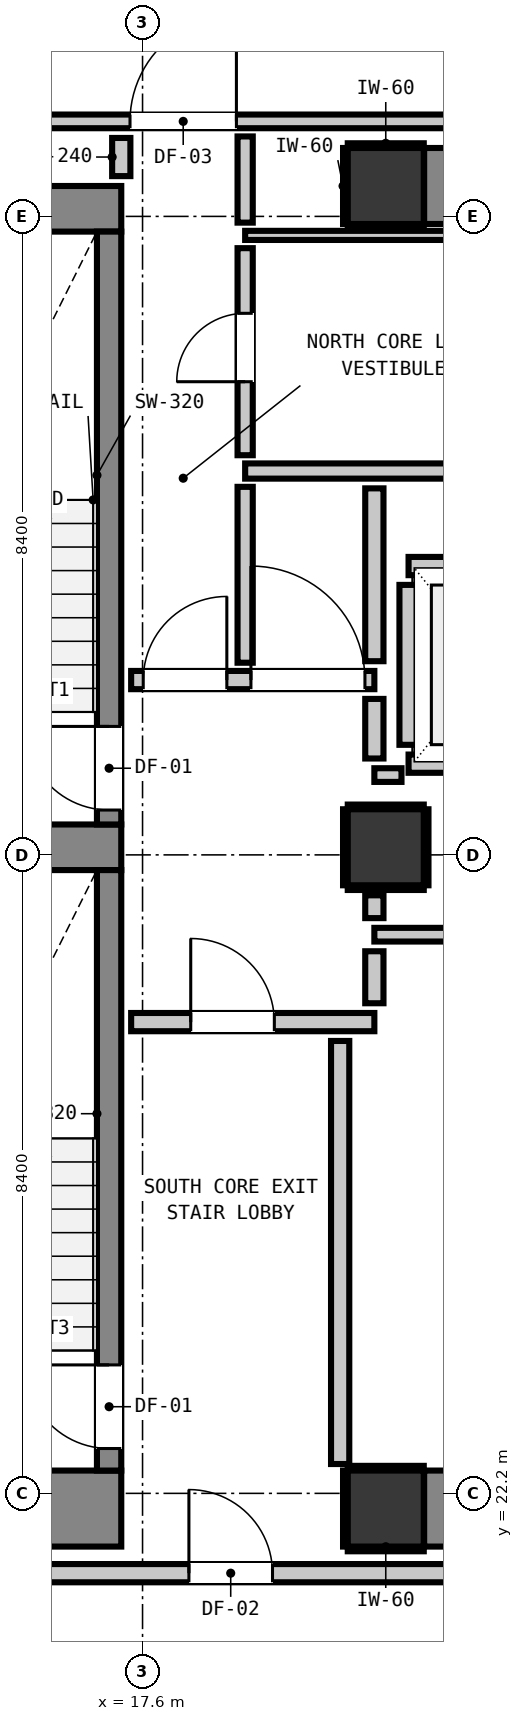
"""IFC4 building model, lengths in metres.
Left out: names, types, materials, properties, quantities, classifications, styles, units other than length and angle.
Written with IfcOpenShell. Run it as: python <this file> out.ifc"""

import sys

from ifc_helpers import new_model, si_unit, direction, frame, frame_2d, origin, origin_2d, place, context, subcontext, project, spatial, rectangle, extrude, element, fill, save


model = new_model("IFC4")
c1 = context("Model", 3, precision=1e-05, world=origin(), true_north=direction((0.0, 1.0)))
c2 = subcontext(c1, "Body", "Model", "MODEL_VIEW")
j1 = project(units=[si_unit("LENGTHUNIT", "METRE"), si_unit("PLANEANGLEUNIT", "RADIAN")], contexts=[c1])
p1 = place(None, origin())
s1 = spatial("IfcSite", under=j1, at=p1, CompositionType="ELEMENT")
p2 = place(p1, origin())
s2 = spatial("IfcBuilding", under=s1, at=p2, CompositionType="ELEMENT")
p3 = place(p2, frame((0.0, 0.0, 135.96)))
s3 = spatial("IfcBuildingStorey", under=s2, at=p3, CompositionType="ELEMENT", Elevation=135.96)
for number, where, z_axis, x_axis in (
    (1, (20.8, 22.0, 0.0), (0.0, 0.0, 1.0), (1.0, 0.0, 0.0)),
    (2, (20.8, 39.4, 0.0), (0.0, 0.0, 1.0), (1.0, 0.0, 0.0)),
):
    element("IfcColumn", number, at=place(p3, frame(where, z_axis=z_axis, x_axis=x_axis)), inside=s3, PredefinedType="COLUMN", context=c2, shape_type="SweptSolid", body=[
        extrude(rectangle(XDim=1.0, YDim=1.0, at=origin_2d()), origin(), (0.0, 0.0, 1.0), 3.32),
    ])
p4 = place(p3, frame((13.24, 22.0, 0.0), z_axis=(0.0, 0.0, 1.0), x_axis=(1.0, 0.0, 0.0)))
e3 = element("IfcWall", 3, at=p4, inside=s3, PredefinedType="SHEAR", context=c2, shape_type="SweptSolid", body=[
    extrude(rectangle(XDim=4.08, YDim=1.0, at=frame_2d((2.04, 0.0))), origin(), (0.0, 0.0, 1.0), 3.32),
])
p5 = place(p3, frame((13.24, 39.1, 0.0), z_axis=(0.0, 0.0, 1.0), x_axis=(1.0, 0.0, 0.0)))
e4 = element("IfcWall", 4, at=p5, inside=s3, PredefinedType="SHEAR", context=c2, shape_type="SweptSolid", body=[
    extrude(rectangle(XDim=4.08, YDim=0.6, at=frame_2d((2.04, 0.0))), origin(), (0.0, 0.0, 1.0), 3.32),
])
p6 = place(p3, frame((13.905, 30.7, 0.0), z_axis=(0.0, 0.0, 1.0), x_axis=(1.0, 0.0, 0.0)))
e5 = element("IfcWall", 5, at=p6, inside=s3, PredefinedType="SHEAR", context=c2, shape_type="SweptSolid", body=[
    extrude(rectangle(XDim=3.415, YDim=0.6, at=frame_2d((1.708, 0.0))), origin(), (0.0, 0.0, 1.0), 3.32),
])
for number, where, z_axis, x_axis in (
    (6, (21.305, 22.0, 0.0), (0.0, 0.0, 1.0), (1.0, 0.0, 0.0)),
    (7, (21.305, 39.4, 0.0), (0.0, 0.0, 1.0), (1.0, 0.0, 0.0)),
):
    element("IfcWall", number, at=place(p3, frame(where, z_axis=z_axis, x_axis=x_axis)), inside=s3, PredefinedType="SHEAR", context=c2, shape_type="SweptSolid", body=[
        extrude(rectangle(XDim=7.39, YDim=1.0, at=frame_2d((3.695, 0.0))), origin(), (0.0, 0.0, 1.0), 3.32),
    ])
p7 = place(p3, frame((17.16, 31.0, 0.0), z_axis=(0.0, 0.0, 1.0), x_axis=(0.0, 1.0, 0.0)))
e8 = element("IfcWall", 8, at=p7, inside=s3, PredefinedType="SHEAR", context=c2, shape_type="SweptSolid", body=[
    extrude(rectangle(XDim=7.8, YDim=0.32, at=frame_2d((3.9, 0.0))), origin(), (0.0, 0.0, 1.0), 3.32),
])
p8 = place(p7, frame((0.19, 0.0, 0.0)))
e9 = element("IfcOpeningElement", 9, at=p8, cuts=e8, PredefinedType="OPENING", context=c2, shape_type="SweptSolid", body=[
    extrude(rectangle(XDim=1.1, YDim=2.15, at=frame_2d((0.55, 1.075))), frame((0.0, 0.17, 0.0), z_axis=(0.0, -1.0, 0.0), x_axis=(1.0, 0.0, 0.0)), (0.0, 0.0, 1.0), 0.34),
])
p9 = place(p3, frame((17.16, 22.5, 0.0), z_axis=(0.0, 0.0, 1.0), x_axis=(0.0, 1.0, 0.0)))
e10 = element("IfcWall", 10, at=p9, inside=s3, PredefinedType="SHEAR", context=c2, shape_type="SweptSolid", body=[
    extrude(rectangle(XDim=7.9, YDim=0.32, at=frame_2d((3.95, 0.0))), origin(), (0.0, 0.0, 1.0), 3.32),
])
p10 = place(p9, frame((0.29, 0.0, 0.0)))
e11 = element("IfcOpeningElement", 11, at=p10, cuts=e10, PredefinedType="OPENING", context=c2, shape_type="SweptSolid", body=[
    extrude(rectangle(XDim=1.1, YDim=2.15, at=frame_2d((0.55, 1.075))), frame((0.0, 0.17, 0.0), z_axis=(0.0, -1.0, 0.0), x_axis=(1.0, 0.0, 0.0)), (0.0, 0.0, 1.0), 0.34),
])
p11 = place(p3, frame((20.8, 30.7, 0.0), z_axis=(0.0, 0.0, 1.0), x_axis=(1.0, 0.0, 0.0)))
e12 = element("IfcColumn", 12, at=p11, inside=s3, PredefinedType="COLUMN", context=c2, shape_type="SweptSolid", body=[
    extrude(rectangle(XDim=1.0, YDim=1.0, at=origin_2d()), origin(), (0.0, 0.0, 1.0), 3.32),
])
for number, where, z_axis, x_axis in (
    (13, (21.1, 31.8, 0.0), (0.0, 0.0, 1.0), (1.0, 0.0, 0.0)),
    (14, (21.1, 34.4, 0.0), (0.0, 0.0, 1.0), (1.0, 0.0, 0.0)),
):
    element("IfcWall", number, at=place(p3, frame(where, z_axis=z_axis, x_axis=x_axis)), inside=s3, PredefinedType="PARTITIONING", context=c2, shape_type="SweptSolid", body=[
        extrude(rectangle(XDim=2.2, YDim=0.24, at=frame_2d((1.1, 0.0))), origin(), (0.0, 0.0, 1.0), 3.08),
    ])
p12 = place(p3, frame((21.1, 32.048, 0.0), z_axis=(0.0, 0.0, 1.0), x_axis=(0.0, 1.0, 0.0)))
e15 = element("IfcWall", 15, at=p12, inside=s3, PredefinedType="PARTITIONING", context=c2, shape_type="SweptSolid", body=[
    extrude(rectangle(XDim=2.104, YDim=0.24, at=frame_2d((1.052, 0.0))), origin(), (0.0, 0.0, 1.0), 2.315),
])
p13 = place(p3, frame((9.407, 21.15, 0.0), z_axis=(0.0, 0.0, 1.0), x_axis=(1.0, 0.0, 0.0)))
e16 = element("IfcWall", 16, at=p13, inside=s3, PredefinedType="PARTITIONING", context=c2, shape_type="SweptSolid", body=[
    extrude(rectangle(XDim=39.386, YDim=0.24, at=frame_2d((19.693, 0.0))), origin(), (0.0, 0.0, 1.0), 3.08),
])
p14 = place(p13, frame((8.803, 0.0, 0.0)))
e17 = element("IfcOpeningElement", 17, at=p14, cuts=e16, PredefinedType="OPENING", context=c2, shape_type="SweptSolid", body=[
    extrude(rectangle(XDim=1.1, YDim=2.15, at=frame_2d((0.55, 1.075))), frame((0.0, 0.13, 0.0), z_axis=(0.0, -1.0, 0.0), x_axis=(1.0, 0.0, 0.0)), (0.0, 0.0, 1.0), 0.26),
])
p15 = place(p13, frame((1.192, 0.0, 0.0)))
e18 = element("IfcOpeningElement", 18, at=p15, cuts=e16, PredefinedType="OPENING", context=c2, shape_type="SweptSolid", body=[
    extrude(rectangle(XDim=1.4, YDim=2.15, at=frame_2d((0.7, 1.075))), frame((0.0, 0.13, 0.0), z_axis=(0.0, -1.0, 0.0), x_axis=(1.0, 0.0, 0.0)), (0.0, 0.0, 1.0), 0.26),
])
p16 = place(p13, frame((28.643, 0.0, 0.0)))
e19 = element("IfcOpeningElement", 19, at=p16, cuts=e16, PredefinedType="OPENING", context=c2, shape_type="SweptSolid", body=[
    extrude(rectangle(XDim=1.4, YDim=2.15, at=frame_2d((0.7, 1.075))), frame((0.0, 0.13, 0.0), z_axis=(0.0, -1.0, 0.0), x_axis=(1.0, 0.0, 0.0)), (0.0, 0.0, 1.0), 0.26),
])
p17 = place(p3, frame((17.45, 28.4, 0.0), z_axis=(0.0, 0.0, 1.0), x_axis=(1.0, 0.0, 0.0)))
e20 = element("IfcWall", 20, at=p17, inside=s3, PredefinedType="PARTITIONING", context=c2, shape_type="SweptSolid", body=[
    extrude(rectangle(XDim=3.2, YDim=0.24, at=frame_2d((1.6, 0.0))), origin(), (0.0, 0.0, 1.0), 3.08),
])
p18 = place(p17, frame((0.784, 0.0, 0.0)))
e21 = element("IfcOpeningElement", 21, at=p18, cuts=e20, PredefinedType="OPENING", context=c2, shape_type="SweptSolid", body=[
    extrude(rectangle(XDim=1.1, YDim=2.15, at=frame_2d((0.55, 1.075))), frame((0.0, 0.13, 0.0), z_axis=(0.0, -1.0, 0.0), x_axis=(1.0, 0.0, 0.0)), (0.0, 0.0, 1.0), 0.26),
])
p19 = place(p3, frame((17.45, 32.9, 0.0), z_axis=(0.0, 0.0, 1.0), x_axis=(1.0, 0.0, 0.0)))
e22 = element("IfcWall", 22, at=p19, inside=s3, PredefinedType="PARTITIONING", context=c2, shape_type="SweptSolid", body=[
    extrude(rectangle(XDim=3.2, YDim=0.24, at=frame_2d((1.6, 0.0))), origin(), (0.0, 0.0, 1.0), 3.08),
])
p20 = place(p19, frame((0.159, 0.0, 0.0)))
e23 = element("IfcOpeningElement", 23, at=p20, cuts=e22, PredefinedType="OPENING", context=c2, shape_type="SweptSolid", body=[
    extrude(rectangle(XDim=1.1, YDim=2.15, at=frame_2d((0.55, 1.075))), frame((0.0, 0.13, 0.0), z_axis=(0.0, -1.0, 0.0), x_axis=(1.0, 0.0, 0.0)), (0.0, 0.0, 1.0), 0.26),
])
p21 = place(p19, frame((1.576, 0.0, 0.0)))
e24 = element("IfcOpeningElement", 24, at=p21, cuts=e22, PredefinedType="OPENING", context=c2, shape_type="SweptSolid", body=[
    extrude(rectangle(XDim=1.5, YDim=2.15, at=frame_2d((0.75, 1.075))), frame((0.0, 0.13, 0.0), z_axis=(0.0, -1.0, 0.0), x_axis=(1.0, 0.0, 0.0)), (0.0, 0.0, 1.0), 0.26),
])
p22 = place(p3, frame((18.95, 35.65, 0.0), z_axis=(0.0, 0.0, 1.0), x_axis=(1.0, 0.0, 0.0)))
e25 = element("IfcWall", 25, at=p22, inside=s3, PredefinedType="PARTITIONING", context=c2, shape_type="SweptSolid", body=[
    extrude(rectangle(XDim=11.025, YDim=0.2, at=frame_2d((5.513, 0.0))), origin(), (0.0, 0.0, 1.0), 3.08),
])
p23 = place(p3, frame((20.65, 29.55, 0.0), z_axis=(0.0, 0.0, 1.0), x_axis=(1.0, 0.0, 0.0)))
e26 = element("IfcWall", 26, at=p23, inside=s3, PredefinedType="PARTITIONING", context=c2, shape_type="SweptSolid", body=[
    extrude(rectangle(XDim=9.325, YDim=0.18, at=frame_2d((4.663, 0.0))), origin(), (0.0, 0.0, 1.0), 3.08),
])
p24 = place(p3, frame((20.65, 31.65, 0.0), z_axis=(0.0, 0.0, 1.0), x_axis=(1.0, 0.0, 0.0)))
e27 = element("IfcWall", 27, at=p24, inside=s3, PredefinedType="PARTITIONING", context=c2, shape_type="SweptSolid", body=[
    extrude(rectangle(XDim=0.357, YDim=0.18, at=frame_2d((0.179, 0.0))), origin(), (0.0, 0.0, 1.0), 3.08),
])
p25 = place(p3, frame((9.407, 40.25, 0.0), z_axis=(0.0, 0.0, 1.0), x_axis=(1.0, 0.0, 0.0)))
e28 = element("IfcWall", 28, at=p25, inside=s3, PredefinedType="PARTITIONING", context=c2, shape_type="SweptSolid", body=[
    extrude(rectangle(XDim=27.536, YDim=0.18, at=frame_2d((13.768, 0.0))), origin(), (0.0, 0.0, 1.0), 3.08),
])
p26 = place(p25, frame((8.028, 0.0, 0.0)))
e29 = element("IfcOpeningElement", 29, at=p26, cuts=e28, PredefinedType="OPENING", context=c2, shape_type="SweptSolid", body=[
    extrude(rectangle(XDim=1.4, YDim=2.15, at=frame_2d((0.7, 1.075))), frame((0.0, 0.1, 0.0), z_axis=(0.0, -1.0, 0.0), x_axis=(1.0, 0.0, 0.0)), (0.0, 0.0, 1.0), 0.2),
])
p27 = place(p25, frame((1.192, 0.0, 0.0)))
e30 = element("IfcOpeningElement", 30, at=p27, cuts=e28, PredefinedType="OPENING", context=c2, shape_type="SweptSolid", body=[
    extrude(rectangle(XDim=1.4, YDim=2.15, at=frame_2d((0.7, 1.075))), frame((0.0, 0.1, 0.0), z_axis=(0.0, -1.0, 0.0), x_axis=(1.0, 0.0, 0.0)), (0.0, 0.0, 1.0), 0.2),
])
p28 = place(p3, frame((18.95, 38.75, 0.0), z_axis=(0.0, 0.0, 1.0), x_axis=(1.0, 0.0, 0.0)))
e31 = element("IfcWall", 31, at=p28, inside=s3, PredefinedType="PARTITIONING", context=c2, shape_type="SweptSolid", body=[
    extrude(rectangle(XDim=13.56, YDim=0.12, at=frame_2d((6.78, 0.0))), origin(), (0.0, 0.0, 1.0), 3.08),
])
p29 = place(p3, frame((17.32, 39.53, 0.0), z_axis=(0.0, 0.0, 1.0), x_axis=(0.0, 1.0, 0.0)))
e32 = element("IfcWall", 32, at=p29, inside=s3, PredefinedType="PARTITIONING", context=c2, shape_type="SweptSolid", body=[
    extrude(rectangle(XDim=0.502, YDim=0.24, at=frame_2d((0.251, 0.0))), origin(), (0.0, 0.0, 1.0), 3.08),
])
p30 = place(p3, frame((20.2, 22.586, 0.0), z_axis=(0.0, 0.0, 1.0), x_axis=(0.0, 1.0, 0.0)))
e33 = element("IfcWall", 33, at=p30, inside=s3, PredefinedType="PARTITIONING", context=c2, shape_type="SweptSolid", body=[
    extrude(rectangle(XDim=5.566, YDim=0.24, at=frame_2d((2.783, 0.0))), origin(), (0.0, 0.0, 1.0), 3.08),
])
p31 = place(p3, frame((20.65, 28.648, 0.0), z_axis=(0.0, 0.0, 1.0), x_axis=(0.0, 1.0, 0.0)))
e34 = element("IfcWall", 34, at=p31, inside=s3, PredefinedType="PARTITIONING", context=c2, shape_type="SweptSolid", body=[
    extrude(rectangle(XDim=0.684, YDim=0.24, at=frame_2d((0.342, 0.0))), origin(), (0.0, 0.0, 1.0), 2.315),
])
p32 = place(p3, frame((20.65, 29.768, 0.0), z_axis=(0.0, 0.0, 1.0), x_axis=(0.0, 1.0, 0.0)))
e35 = element("IfcWall", 35, at=p32, inside=s3, PredefinedType="PARTITIONING", context=c2, shape_type="SweptSolid", body=[
    extrude(rectangle(XDim=0.3, YDim=0.24, at=frame_2d((0.15, 0.0))), origin(), (0.0, 0.0, 1.0), 2.315),
])
p33 = place(p3, frame((20.65, 31.868, 0.0), z_axis=(0.0, 0.0, 1.0), x_axis=(0.0, 1.0, 0.0)))
e36 = element("IfcWall", 36, at=p33, inside=s3, PredefinedType="PARTITIONING", context=c2, shape_type="SweptSolid", body=[
    extrude(rectangle(XDim=0.784, YDim=0.24, at=frame_2d((0.392, 0.0))), origin(), (0.0, 0.0, 1.0), 2.315),
])
p34 = place(p3, frame((20.65, 33.148, 0.0), z_axis=(0.0, 0.0, 1.0), x_axis=(0.0, 1.0, 0.0)))
e37 = element("IfcWall", 37, at=p34, inside=s3, PredefinedType="PARTITIONING", context=c2, shape_type="SweptSolid", body=[
    extrude(rectangle(XDim=2.274, YDim=0.24, at=frame_2d((1.137, 0.0))), origin(), (0.0, 0.0, 1.0), 2.315),
])
p35 = place(p3, frame((18.95, 33.128, 0.0), z_axis=(0.0, 0.0, 1.0), x_axis=(0.0, 1.0, 0.0)))
e38 = element("IfcWall", 38, at=p35, inside=s3, PredefinedType="PARTITIONING", context=c2, shape_type="SweptSolid", body=[
    extrude(rectangle(XDim=2.314, YDim=0.2, at=frame_2d((1.157, 0.0))), origin(), (0.0, 0.0, 1.0), 3.08),
])
p36 = place(p3, frame((18.95, 35.858, 0.0), z_axis=(0.0, 0.0, 1.0), x_axis=(0.0, 1.0, 0.0)))
e39 = element("IfcWall", 39, at=p36, inside=s3, PredefinedType="PARTITIONING", context=c2, shape_type="SweptSolid", body=[
    extrude(rectangle(XDim=2.724, YDim=0.2, at=frame_2d((1.362, 0.0))), origin(), (0.0, 0.0, 1.0), 3.08),
])
p37 = place(p36, frame((0.967, 0.0, 0.0)))
e40 = element("IfcOpeningElement", 40, at=p37, cuts=e39, PredefinedType="OPENING", context=c2, shape_type="SweptSolid", body=[
    extrude(rectangle(XDim=0.9, YDim=2.1, at=frame_2d((0.45, 1.05))), frame((0.0, 0.11, 0.0), z_axis=(0.0, -1.0, 0.0), x_axis=(1.0, 0.0, 0.0)), (0.0, 0.0, 1.0), 0.22),
])
p38 = place(p3, frame((18.95, 38.918, 0.0), z_axis=(0.0, 0.0, 1.0), x_axis=(0.0, 1.0, 0.0)))
e41 = element("IfcWall", 41, at=p38, inside=s3, PredefinedType="PARTITIONING", context=c2, shape_type="SweptSolid", body=[
    extrude(rectangle(XDim=1.134, YDim=0.2, at=frame_2d((0.567, 0.0))), origin(), (0.0, 0.0, 1.0), 3.08),
])
for number, where, z_axis, x_axis in (
    (42, (20.3, 21.468, 0.0), (0.0, 0.0, 1.0), (1.0, 0.0, 0.0)),
    (43, (20.3, 22.532, 0.0), (0.0, 0.0, 1.0), (1.0, 0.0, 0.0)),
    (44, (20.268, 21.5, 0.0), (0.0, 0.0, 1.0), (0.0, 1.0, 0.0)),
    (45, (20.3, 38.868, 0.0), (0.0, 0.0, 1.0), (1.0, 0.0, 0.0)),
    (46, (20.3, 39.932, 0.0), (0.0, 0.0, 1.0), (1.0, 0.0, 0.0)),
    (47, (20.268, 38.9, 0.0), (0.0, 0.0, 1.0), (0.0, 1.0, 0.0)),
    (48, (20.3, 30.168, 0.0), (0.0, 0.0, 1.0), (1.0, 0.0, 0.0)),
    (49, (20.3, 31.232, 0.0), (0.0, 0.0, 1.0), (1.0, 0.0, 0.0)),
    (50, (20.268, 30.2, 0.0), (0.0, 0.0, 1.0), (0.0, 1.0, 0.0)),
    (51, (21.332, 30.2, 0.0), (0.0, 0.0, 1.0), (0.0, 1.0, 0.0)),
):
    element("IfcWall", number, at=place(p3, frame(where, z_axis=z_axis, x_axis=x_axis)), inside=s3, PredefinedType="PARTITIONING", context=c2, shape_type="SweptSolid", body=[
        extrude(rectangle(XDim=1.0, YDim=0.06, at=frame_2d((0.5, 0.0))), origin(), (0.0, 0.0, 1.0), 1.45),
    ])
p39 = place(p8, origin())
e52 = element("IfcDoor", 52, at=p39, inside=s3, OperationType="SINGLE_SWING_RIGHT", PredefinedType="DOOR", context=c2, shape_type="SweptSolid", body=[
    extrude(rectangle(XDim=1.1, YDim=2.15, at=frame_2d((0.55, 1.075))), frame((0.0, 0.025, 0.0), z_axis=(0.0, -1.0, 0.0), x_axis=(1.0, 0.0, 0.0)), (0.0, 0.0, 1.0), 0.05),
])
fill(e9, e52)
p40 = place(p10, origin())
e53 = element("IfcDoor", 53, at=p40, inside=s3, OperationType="SINGLE_SWING_RIGHT", PredefinedType="DOOR", context=c2, shape_type="SweptSolid", body=[
    extrude(rectangle(XDim=1.1, YDim=2.15, at=frame_2d((0.55, 1.075))), frame((0.0, 0.025, 0.0), z_axis=(0.0, -1.0, 0.0), x_axis=(1.0, 0.0, 0.0)), (0.0, 0.0, 1.0), 0.05),
])
fill(e11, e53)
p41 = place(p18, origin())
e54 = element("IfcDoor", 54, at=p41, inside=s3, OperationType="SINGLE_SWING_LEFT", PredefinedType="DOOR", context=c2, shape_type="SweptSolid", body=[
    extrude(rectangle(XDim=1.1, YDim=2.15, at=frame_2d((0.55, 1.075))), frame((0.0, 0.025, 0.0), z_axis=(0.0, -1.0, 0.0), x_axis=(1.0, 0.0, 0.0)), (0.0, 0.0, 1.0), 0.05),
])
fill(e21, e54)
p42 = place(p20, origin())
e55 = element("IfcDoor", 55, at=p42, inside=s3, OperationType="SINGLE_SWING_RIGHT", PredefinedType="DOOR", context=c2, shape_type="SweptSolid", body=[
    extrude(rectangle(XDim=1.1, YDim=2.15, at=frame_2d((0.55, 1.075))), frame((0.0, 0.025, 0.0), z_axis=(0.0, -1.0, 0.0), x_axis=(1.0, 0.0, 0.0)), (0.0, 0.0, 1.0), 0.05),
])
fill(e23, e55)
p43 = place(p14, origin())
e56 = element("IfcDoor", 56, at=p43, inside=s3, OperationType="SINGLE_SWING_LEFT", PredefinedType="DOOR", context=c2, shape_type="SweptSolid", body=[
    extrude(rectangle(XDim=1.1, YDim=2.15, at=frame_2d((0.55, 1.075))), frame((0.0, 0.025, 0.0), z_axis=(0.0, -1.0, 0.0), x_axis=(1.0, 0.0, 0.0)), (0.0, 0.0, 1.0), 0.05),
])
fill(e17, e56)
p44 = place(p26, origin())
e57 = element("IfcDoor", 57, at=p44, inside=s3, OperationType="SINGLE_SWING_RIGHT", PredefinedType="DOOR", context=c2, shape_type="SweptSolid", body=[
    extrude(rectangle(XDim=1.4, YDim=2.15, at=frame_2d((0.7, 1.075))), frame((0.0, 0.025, 0.0), z_axis=(0.0, -1.0, 0.0), x_axis=(1.0, 0.0, 0.0)), (0.0, 0.0, 1.0), 0.05),
])
fill(e29, e57)
p45 = place(p21, origin())
e58 = element("IfcDoor", 58, at=p45, inside=s3, OperationType="SINGLE_SWING_LEFT", PredefinedType="DOOR", context=c2, shape_type="SweptSolid", body=[
    extrude(rectangle(XDim=1.5, YDim=2.15, at=frame_2d((0.75, 1.075))), frame((0.0, 0.025, 0.0), z_axis=(0.0, -1.0, 0.0), x_axis=(1.0, 0.0, 0.0)), (0.0, 0.0, 1.0), 0.05),
])
fill(e24, e58)
p46 = place(p37, origin())
e59 = element("IfcDoor", 59, at=p46, inside=s3, OperationType="SINGLE_SWING_LEFT", PredefinedType="DOOR", context=c2, shape_type="SweptSolid", body=[
    extrude(rectangle(XDim=0.9, YDim=2.1, at=frame_2d((0.45, 1.05))), frame((0.0, 0.025, 0.0), z_axis=(0.0, -1.0, 0.0), x_axis=(1.0, 0.0, 0.0)), (0.0, 0.0, 1.0), 0.05),
])
fill(e40, e59)
save(model, sys.argv[1])
